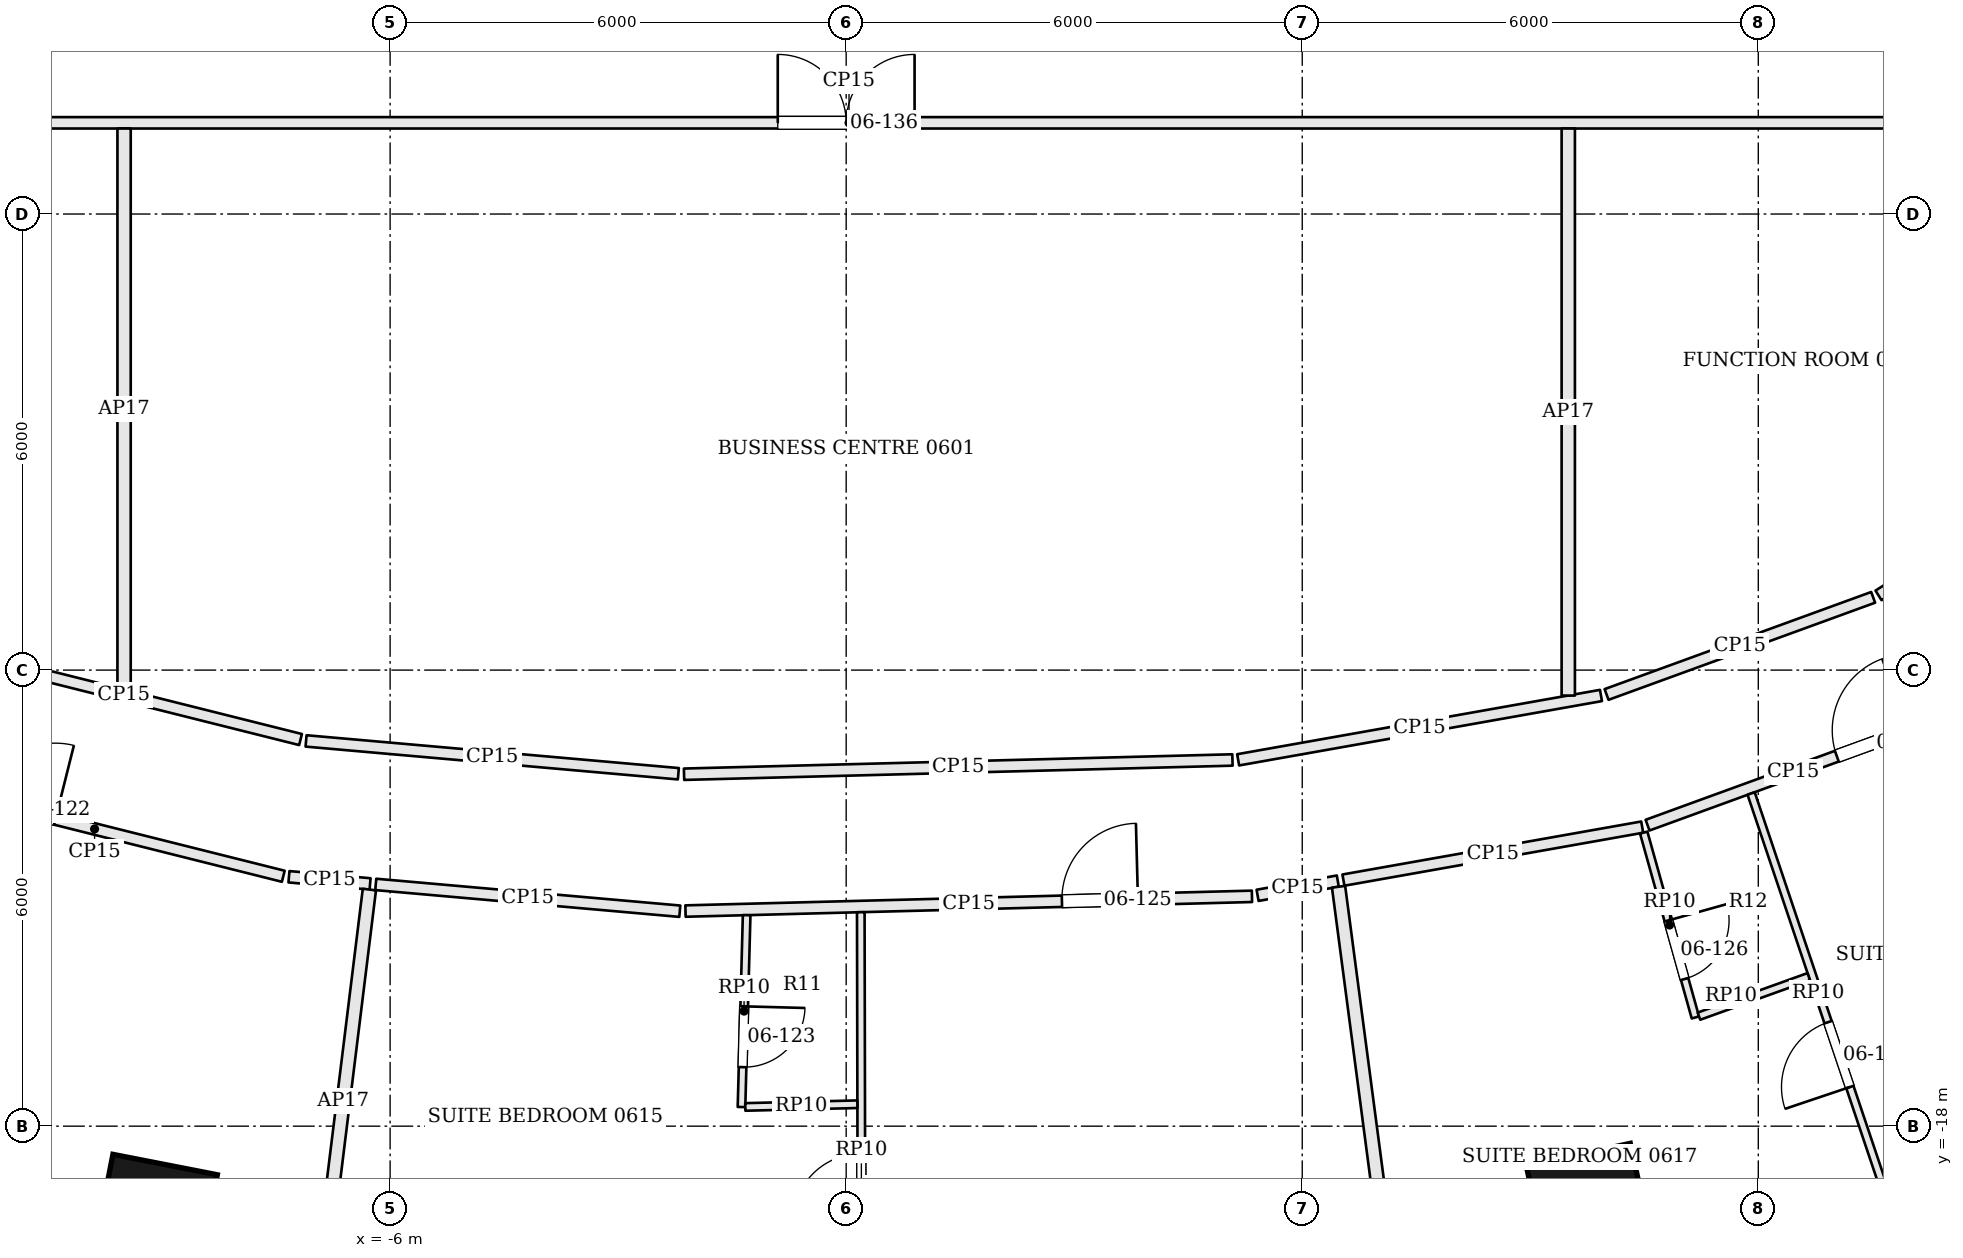
"""IFC4 building model, lengths in metres.
Left out: names, types, materials, properties, quantities, classifications, styles, units other than length and angle.
Written with IfcOpenShell. Run it as: python <this file> out.ifc"""

import sys

from ifc_helpers import new_model, si_unit, direction, frame, frame_2d, origin, origin_2d, place, context, subcontext, project, spatial, rectangle, extrude, element, fill, save


model = new_model("IFC4")
c1 = context("Model", 3, precision=1e-05, world=origin(), true_north=direction((0.0, 1.0)))
c2 = subcontext(c1, "Body", "Model", "MODEL_VIEW")
j1 = project(units=[si_unit("LENGTHUNIT", "METRE"), si_unit("PLANEANGLEUNIT", "RADIAN")], contexts=[c1])
p1 = place(None, origin())
s1 = spatial("IfcSite", under=j1, at=p1, CompositionType="ELEMENT")
p2 = place(p1, origin())
s2 = spatial("IfcBuilding", under=s1, at=p2, CompositionType="ELEMENT")
p3 = place(p2, frame((0.0, 0.0, 37.5)))
s3 = spatial("IfcBuildingStorey", under=s2, at=p3, CompositionType="ELEMENT", Elevation=37.5)
for number, where, z_axis, x_axis in (
    (1, (-9.094, -19.192, 0.0), (0.0, 0.0, 1.0), (0.981, -0.192, 0.0)),
    (2, (9.78, -19.058, 0.0), (0.0, 0.0, 1.0), (0.977, 0.211, 0.0)),
):
    element("IfcColumn", number, at=place(p3, frame(where, z_axis=z_axis, x_axis=x_axis)), inside=s3, PredefinedType="COLUMN", context=c2, shape_type="SweptSolid", body=[
        extrude(rectangle(XDim=1.4, YDim=1.4, at=origin_2d()), origin(), (0.0, 0.0, 1.0), 3.6),
    ])
p4 = place(p3, frame((10.879, -21.473, 0.0), z_axis=(0.0, 0.0, 1.0), x_axis=(0.77124668946, 0.636536365023, 0.0)))
e3 = element("IfcWall", 3, at=p4, inside=s3, PredefinedType="SOLIDWALL", context=c2, shape_type="SweptSolid", body=[
    extrude(rectangle(XDim=4.261, YDim=0.45, at=frame_2d((2.13, 0.0))), origin(), (0.0, 0.0, 1.0), 3.4),
])
p5 = place(p4, frame((1.08, 0.0, 0.9)))
e4 = element("IfcOpeningElement", 4, at=p5, cuts=e3, PredefinedType="OPENING", context=c2, shape_type="SweptSolid", body=[
    extrude(rectangle(XDim=2.1, YDim=2.0, at=frame_2d((1.05, 1.0))), frame((0.0, 0.235, 0.0), z_axis=(0.0, -1.0, 0.0), x_axis=(1.0, 0.0, 0.0)), (0.0, 0.0, 1.0), 0.47),
])
p6 = place(p3, frame((-12.371, -13.468, 0.0), z_axis=(0.0, 0.0, 1.0), x_axis=(0.969987994087, -0.243152814764, 0.0)))
e5 = element("IfcWall", 5, at=p6, inside=s3, PredefinedType="PARTITIONING", context=c2, shape_type="SweptSolid", body=[
    extrude(rectangle(XDim=5.119, YDim=0.15, at=frame_2d((2.559, 0.0))), origin(), (0.0, 0.0, 1.0), 2.68),
])
p7 = place(p6, frame((1.028, 0.0, 0.0)))
e6 = element("IfcOpeningElement", 6, at=p7, cuts=e5, PredefinedType="OPENING", context=c2, shape_type="SweptSolid", body=[
    extrude(rectangle(XDim=1.0, YDim=2.1, at=frame_2d((0.5, 1.05))), frame((0.0, 0.085, 0.0), z_axis=(0.0, -1.0, 0.0), x_axis=(1.0, 0.0, 0.0)), (0.0, 0.0, 1.0), 0.17),
])
p8 = place(p3, frame((-7.331, -14.719, 0.0), z_axis=(0.0, 0.0, 1.0), x_axis=(0.996145089984, -0.087720919406, 0.0)))
e7 = element("IfcWall", 7, at=p8, inside=s3, PredefinedType="PARTITIONING", context=c2, shape_type="SweptSolid", body=[
    extrude(rectangle(XDim=1.072, YDim=0.15, at=frame_2d((0.536, 0.0))), origin(), (0.0, 0.0, 1.0), 2.68),
])
p9 = place(p3, frame((-6.96, -20.462, 0.0), z_axis=(0.0, 0.0, 1.0), x_axis=(0.122317252329, 0.992491052747, 0.0)))
e8 = element("IfcWall", 8, at=p9, inside=s3, PredefinedType="PARTITIONING", context=c2, shape_type="SweptSolid", body=[
    extrude(rectangle(XDim=5.617, YDim=0.175, at=frame_2d((2.808, 0.0))), origin(), (0.0, 0.0, 1.0), 2.68),
])
p10 = place(p3, frame((-6.189, -14.82, 0.0), z_axis=(0.0, 0.0, 1.0), x_axis=(0.996138144042, -0.087799760727, 0.0)))
e9 = element("IfcWall", 9, at=p10, inside=s3, PredefinedType="PARTITIONING", context=c2, shape_type="SweptSolid", body=[
    extrude(rectangle(XDim=4.015, YDim=0.15, at=frame_2d((2.008, 0.0))), origin(), (0.0, 0.0, 1.0), 2.68),
])
p11 = place(p3, frame((-2.114, -15.17, 0.0), z_axis=(0.0, 0.0, 1.0), x_axis=(0.999661895531, 0.026001819598, 0.0)))
e10 = element("IfcWall", 10, at=p11, inside=s3, PredefinedType="PARTITIONING", context=c2, shape_type="SweptSolid", body=[
    extrude(rectangle(XDim=7.455, YDim=0.15, at=frame_2d((3.728, 0.0))), origin(), (0.0, 0.0, 1.0), 2.68),
])
p12 = place(p11, frame((4.954, 0.0, 0.0)))
e11 = element("IfcOpeningElement", 11, at=p12, cuts=e10, PredefinedType="OPENING", context=c2, shape_type="SweptSolid", body=[
    extrude(rectangle(XDim=1.0, YDim=2.1, at=frame_2d((0.5, 1.05))), frame((0.0, 0.085, 0.0), z_axis=(0.0, -1.0, 0.0), x_axis=(1.0, 0.0, 0.0)), (0.0, 0.0, 1.0), 0.17),
])
p13 = place(p3, frame((5.413, -14.963, 0.0), z_axis=(0.0, 0.0, 1.0), x_axis=(0.984622634161, 0.174694786121, 0.0)))
e12 = element("IfcWall", 12, at=p13, inside=s3, PredefinedType="PARTITIONING", context=c2, shape_type="SweptSolid", body=[
    extrude(rectangle(XDim=1.072, YDim=0.15, at=frame_2d((0.536, 0.0))), origin(), (0.0, 0.0, 1.0), 2.68),
])
p14 = place(p3, frame((7.633, -23.608, 0.0), z_axis=(0.0, 0.0, 1.0), x_axis=(-0.130729762954, 0.991418039516, 0.0)))
e13 = element("IfcWall", 13, at=p14, inside=s3, PredefinedType="PARTITIONING", context=c2, shape_type="SweptSolid", body=[
    extrude(rectangle(XDim=8.833, YDim=0.175, at=frame_2d((4.417, 0.0))), origin(), (0.0, 0.0, 1.0), 2.68),
])
p15 = place(p3, frame((6.542, -14.763, 0.0), z_axis=(0.0, 0.0, 1.0), x_axis=(0.984628016341, 0.174664448116, 0.0)))
e14 = element("IfcWall", 14, at=p15, inside=s3, PredefinedType="PARTITIONING", context=c2, shape_type="SweptSolid", body=[
    extrude(rectangle(XDim=3.992, YDim=0.15, at=frame_2d((1.996, 0.0))), origin(), (0.0, 0.0, 1.0), 2.68),
])
p16 = place(p3, frame((10.543, -14.04, 0.0), z_axis=(0.0, 0.0, 1.0), x_axis=(0.939576705301, 0.342338450741, 0.0)))
e15 = element("IfcWall", 15, at=p16, inside=s3, PredefinedType="PARTITIONING", context=c2, shape_type="SweptSolid", body=[
    extrude(rectangle(XDim=4.082, YDim=0.15, at=frame_2d((2.041, 0.0))), origin(), (0.0, 0.0, 1.0), 2.68),
])
p17 = place(p16, frame((2.65, 0.0, 0.0)))
e16 = element("IfcOpeningElement", 16, at=p17, cuts=e15, PredefinedType="OPENING", context=c2, shape_type="SweptSolid", body=[
    extrude(rectangle(XDim=1.0, YDim=2.1, at=frame_2d((0.5, 1.05))), frame((0.0, 0.085, 0.0), z_axis=(0.0, -1.0, 0.0), x_axis=(1.0, 0.0, 0.0)), (0.0, 0.0, 1.0), 0.17),
])
p18 = place(p3, frame((16.517, -9.167, 0.0), z_axis=(0.0, 0.0, 1.0), x_axis=(-0.846000117603, -0.533182708849, 0.0)))
e17 = element("IfcWall", 17, at=p18, inside=s3, PredefinedType="PARTITIONING", context=c2, shape_type="SweptSolid", body=[
    extrude(rectangle(XDim=3.47, YDim=0.15, at=frame_2d((1.735, 0.0))), origin(), (0.0, 0.0, 1.0), 2.68),
])
p19 = place(p3, frame((13.511, -11.043, 0.0), z_axis=(0.0, 0.0, 1.0), x_axis=(-0.939583191704, -0.342320647736, 0.0)))
e18 = element("IfcWall", 18, at=p19, inside=s3, PredefinedType="PARTITIONING", context=c2, shape_type="SweptSolid", body=[
    extrude(rectangle(XDim=3.733, YDim=0.15, at=frame_2d((1.866, 0.0))), origin(), (0.0, 0.0, 1.0), 2.68),
])
p20 = place(p3, frame((9.93, -12.334, 0.0), z_axis=(0.0, 0.0, 1.0), x_axis=(-0.984638212434, -0.174606960386, 0.0)))
e19 = element("IfcWall", 19, at=p20, inside=s3, PredefinedType="PARTITIONING", context=c2, shape_type="SweptSolid", body=[
    extrude(rectangle(XDim=4.848, YDim=0.15, at=frame_2d((2.424, 0.0))), origin(), (0.0, 0.0, 1.0), 2.68),
])
p21 = place(p3, frame((5.082, -13.182, 0.0), z_axis=(0.0, 0.0, 1.0), x_axis=(-0.999661624383, -0.026012242045, 0.0)))
e20 = element("IfcWall", 20, at=p21, inside=s3, PredefinedType="PARTITIONING", context=c2, shape_type="SweptSolid", body=[
    extrude(rectangle(XDim=7.218, YDim=0.15, at=frame_2d((3.609, 0.0))), origin(), (0.0, 0.0, 1.0), 2.68),
])
p22 = place(p3, frame((-2.208, -13.364, 0.0), z_axis=(0.0, 0.0, 1.0), x_axis=(-0.996134962793, 0.087835846335, 0.0)))
e21 = element("IfcWall", 21, at=p22, inside=s3, PredefinedType="PARTITIONING", context=c2, shape_type="SweptSolid", body=[
    extrude(rectangle(XDim=4.917, YDim=0.15, at=frame_2d((2.458, 0.0))), origin(), (0.0, 0.0, 1.0), 2.68),
])
p23 = place(p3, frame((-7.178, -12.914, 0.0), z_axis=(0.0, 0.0, 1.0), x_axis=(-0.969983523639, 0.243170647628, 0.0)))
e22 = element("IfcWall", 22, at=p23, inside=s3, PredefinedType="PARTITIONING", context=c2, shape_type="SweptSolid", body=[
    extrude(rectangle(XDim=4.794, YDim=0.15, at=frame_2d((2.397, 0.0))), origin(), (0.0, 0.0, 1.0), 2.68),
])
p24 = place(p3, frame((-14.725, -4.8, 0.0), z_axis=(0.0, 0.0, 1.0), x_axis=(1.0, 0.0, 0.0)))
e23 = element("IfcWall", 23, at=p24, inside=s3, PredefinedType="PARTITIONING", context=c2, shape_type="SweptSolid", body=[
    extrude(rectangle(XDim=29.525, YDim=0.15, at=frame_2d((14.763, 0.0))), origin(), (0.0, 0.0, 1.0), 2.68),
])
p25 = place(p24, frame((13.825, 0.0, 0.0)))
e24 = element("IfcOpeningElement", 24, at=p25, cuts=e23, PredefinedType="OPENING", context=c2, shape_type="SweptSolid", body=[
    extrude(rectangle(XDim=1.8, YDim=2.1, at=frame_2d((0.9, 1.05))), frame((0.0, 0.085, 0.0), z_axis=(0.0, -1.0, 0.0), x_axis=(1.0, 0.0, 0.0)), (0.0, 0.0, 1.0), 0.17),
])
p26 = place(p3, frame((0.208, -22.553, 0.0), z_axis=(0.0, 0.0, 1.0), x_axis=(-0.002054404359, 0.999997889709, 0.0)))
e25 = element("IfcWall", 25, at=p26, inside=s3, PredefinedType="PARTITIONING", context=c2, shape_type="SweptSolid", body=[
    extrude(rectangle(XDim=7.368, YDim=0.1, at=frame_2d((3.684, 0.0))), origin(), (0.0, 0.0, 1.0), 2.884),
])
p27 = place(p26, frame((3.293, 0.0, 0.0)))
e26 = element("IfcOpeningElement", 26, at=p27, cuts=e25, PredefinedType="OPENING", context=c2, shape_type="SweptSolid", body=[
    extrude(rectangle(XDim=0.9, YDim=2.4, at=frame_2d((0.45, 1.2))), frame((0.0, 0.06, 0.0), z_axis=(0.0, -1.0, 0.0), x_axis=(1.0, 0.0, 0.0)), (0.0, 0.0, 1.0), 0.12),
])
p28 = place(p3, frame((-1.309, -15.224, 0.0), z_axis=(0.0, 0.0, 1.0), x_axis=(-0.026878765722, -0.999638700708, 0.0)))
e27 = element("IfcWall", 27, at=p28, inside=s3, PredefinedType="PARTITIONING", context=c2, shape_type="SweptSolid", body=[
    extrude(rectangle(XDim=2.525, YDim=0.1, at=frame_2d((1.263, 0.0))), origin(), (0.0, 0.0, 1.0), 2.884),
])
p29 = place(p28, frame((1.2, 0.0, 0.0)))
e28 = element("IfcOpeningElement", 28, at=p29, cuts=e27, PredefinedType="OPENING", context=c2, shape_type="SweptSolid", body=[
    extrude(rectangle(XDim=0.8, YDim=2.1, at=frame_2d((0.4, 1.05))), frame((0.0, 0.06, 0.0), z_axis=(0.0, -1.0, 0.0), x_axis=(1.0, 0.0, 0.0)), (0.0, 0.0, 1.0), 0.12),
])
p30 = place(p3, frame((-1.327, -17.747, 0.0), z_axis=(0.0, 0.0, 1.0), x_axis=(0.999707980688, 0.024165126686, 0.0)))
e29 = element("IfcWall", 29, at=p30, inside=s3, PredefinedType="PARTITIONING", context=c2, shape_type="SweptSolid", body=[
    extrude(rectangle(XDim=1.475, YDim=0.1, at=frame_2d((0.738, 0.0))), origin(), (0.0, 0.0, 1.0), 2.884),
])
p31 = place(p3, frame((13.673, -18.876, 0.0), z_axis=(0.0, 0.0, 1.0), x_axis=(-0.318869836417, 0.947798516259, 0.0)))
e30 = element("IfcWall", 30, at=p31, inside=s3, PredefinedType="PARTITIONING", context=c2, shape_type="SweptSolid", body=[
    extrude(rectangle(XDim=5.542, YDim=0.1, at=frame_2d((2.771, 0.0))), origin(), (0.0, 0.0, 1.0), 2.884),
])
p32 = place(p31, frame((1.467, 0.0, 0.0)))
e31 = element("IfcOpeningElement", 31, at=p32, cuts=e30, PredefinedType="OPENING", context=c2, shape_type="SweptSolid", body=[
    extrude(rectangle(XDim=0.9, YDim=2.4, at=frame_2d((0.45, 1.2))), frame((0.0, 0.06, 0.0), z_axis=(0.0, -1.0, 0.0), x_axis=(1.0, 0.0, 0.0)), (0.0, 0.0, 1.0), 0.12),
])
p33 = place(p3, frame((10.493, -14.138, 0.0), z_axis=(0.0, 0.0, 1.0), x_axis=(0.269174437276, -0.963091440268, 0.0)))
e32 = element("IfcWall", 32, at=p33, inside=s3, PredefinedType="PARTITIONING", context=c2, shape_type="SweptSolid", body=[
    extrude(rectangle(XDim=2.525, YDim=0.1, at=frame_2d((1.263, 0.0))), origin(), (0.0, 0.0, 1.0), 2.884),
])
p34 = place(p33, frame((1.2, 0.0, 0.0)))
e33 = element("IfcOpeningElement", 33, at=p34, cuts=e32, PredefinedType="OPENING", context=c2, shape_type="SweptSolid", body=[
    extrude(rectangle(XDim=0.8, YDim=2.1, at=frame_2d((0.4, 1.05))), frame((0.0, 0.06, 0.0), z_axis=(0.0, -1.0, 0.0), x_axis=(1.0, 0.0, 0.0)), (0.0, 0.0, 1.0), 0.12),
])
p35 = place(p3, frame((11.219, -16.553, 0.0), z_axis=(0.0, 0.0, 1.0), x_axis=(0.940976594902, 0.338471635218, 0.0)))
e34 = element("IfcWall", 34, at=p35, inside=s3, PredefinedType="PARTITIONING", context=c2, shape_type="SweptSolid", body=[
    extrude(rectangle(XDim=1.535, YDim=0.1, at=frame_2d((0.768, 0.0))), origin(), (0.0, 0.0, 1.0), 2.884),
])
p36 = place(p3, frame((-9.5, -12.257, 0.0), z_axis=(0.0, 0.0, 1.0), x_axis=(0.0, 1.0, 0.0)))
e35 = element("IfcWall", 35, at=p36, inside=s3, PredefinedType="PARTITIONING", context=c2, shape_type="SweptSolid", body=[
    extrude(rectangle(XDim=7.382, YDim=0.175, at=frame_2d((3.691, 0.0))), origin(), (0.0, 0.0, 1.0), 2.68),
])
p37 = place(p3, frame((9.5, -12.335, 0.0), z_axis=(0.0, 0.0, 1.0), x_axis=(0.0, 1.0, 0.0)))
e36 = element("IfcWall", 36, at=p37, inside=s3, PredefinedType="PARTITIONING", context=c2, shape_type="SweptSolid", body=[
    extrude(rectangle(XDim=7.46, YDim=0.175, at=frame_2d((3.73, 0.0))), origin(), (0.0, 0.0, 1.0), 2.68),
])
p38 = place(p7, origin())
e37 = element("IfcDoor", 37, at=p38, inside=s3, OperationType="SINGLE_SWING_RIGHT", PredefinedType="DOOR", context=c2, shape_type="SweptSolid", body=[
    extrude(rectangle(XDim=1.0, YDim=2.1, at=frame_2d((0.5, 1.05))), frame((0.0, 0.025, 0.0), z_axis=(0.0, -1.0, 0.0), x_axis=(1.0, 0.0, 0.0)), (0.0, 0.0, 1.0), 0.05),
])
fill(e6, e37)
p39 = place(p29, origin())
e38 = element("IfcDoor", 38, at=p39, inside=s3, OperationType="SINGLE_SWING_LEFT", PredefinedType="DOOR", context=c2, shape_type="SweptSolid", body=[
    extrude(rectangle(XDim=0.8, YDim=2.1, at=frame_2d((0.4, 1.05))), frame((0.0, 0.025, 0.0), z_axis=(0.0, -1.0, 0.0), x_axis=(1.0, 0.0, 0.0)), (0.0, 0.0, 1.0), 0.05),
])
fill(e28, e38)
p40 = place(p27, origin())
e39 = element("IfcDoor", 39, at=p40, inside=s3, OperationType="SINGLE_SWING_LEFT", PredefinedType="DOOR", context=c2, shape_type="SweptSolid", body=[
    extrude(rectangle(XDim=0.9, YDim=2.4, at=frame_2d((0.45, 1.2))), frame((0.0, 0.025, 0.0), z_axis=(0.0, -1.0, 0.0), x_axis=(1.0, 0.0, 0.0)), (0.0, 0.0, 1.0), 0.05),
])
fill(e26, e39)
p41 = place(p12, origin())
e40 = element("IfcDoor", 40, at=p41, inside=s3, OperationType="SINGLE_SWING_RIGHT", PredefinedType="DOOR", context=c2, shape_type="SweptSolid", body=[
    extrude(rectangle(XDim=1.0, YDim=2.1, at=frame_2d((0.5, 1.05))), frame((0.0, 0.025, 0.0), z_axis=(0.0, -1.0, 0.0), x_axis=(1.0, 0.0, 0.0)), (0.0, 0.0, 1.0), 0.05),
])
fill(e11, e40)
p42 = place(p34, origin())
e41 = element("IfcDoor", 41, at=p42, inside=s3, OperationType="SINGLE_SWING_LEFT", PredefinedType="DOOR", context=c2, shape_type="SweptSolid", body=[
    extrude(rectangle(XDim=0.8, YDim=2.1, at=frame_2d((0.4, 1.05))), frame((0.0, 0.025, 0.0), z_axis=(0.0, -1.0, 0.0), x_axis=(1.0, 0.0, 0.0)), (0.0, 0.0, 1.0), 0.05),
])
fill(e33, e41)
p43 = place(p32, origin())
e42 = element("IfcDoor", 42, at=p43, inside=s3, OperationType="SINGLE_SWING_LEFT", PredefinedType="DOOR", context=c2, shape_type="SweptSolid", body=[
    extrude(rectangle(XDim=0.9, YDim=2.4, at=frame_2d((0.45, 1.2))), frame((0.0, 0.025, 0.0), z_axis=(0.0, -1.0, 0.0), x_axis=(1.0, 0.0, 0.0)), (0.0, 0.0, 1.0), 0.05),
])
fill(e31, e42)
p44 = place(p17, origin())
e43 = element("IfcDoor", 43, at=p44, inside=s3, OperationType="SINGLE_SWING_RIGHT", PredefinedType="DOOR", context=c2, shape_type="SweptSolid", body=[
    extrude(rectangle(XDim=1.0, YDim=2.1, at=frame_2d((0.5, 1.05))), frame((0.0, 0.025, 0.0), z_axis=(0.0, -1.0, 0.0), x_axis=(1.0, 0.0, 0.0)), (0.0, 0.0, 1.0), 0.05),
])
fill(e16, e43)
p45 = place(p25, origin())
e44 = element("IfcDoor", 44, at=p45, inside=s3, OperationType="DOUBLE_DOOR_SINGLE_SWING", PredefinedType="DOOR", context=c2, shape_type="SweptSolid", body=[
    extrude(rectangle(XDim=1.8, YDim=2.1, at=frame_2d((0.9, 1.05))), frame((0.0, 0.025, 0.0), z_axis=(0.0, -1.0, 0.0), x_axis=(1.0, 0.0, 0.0)), (0.0, 0.0, 1.0), 0.05),
])
fill(e24, e44)
save(model, sys.argv[1])
